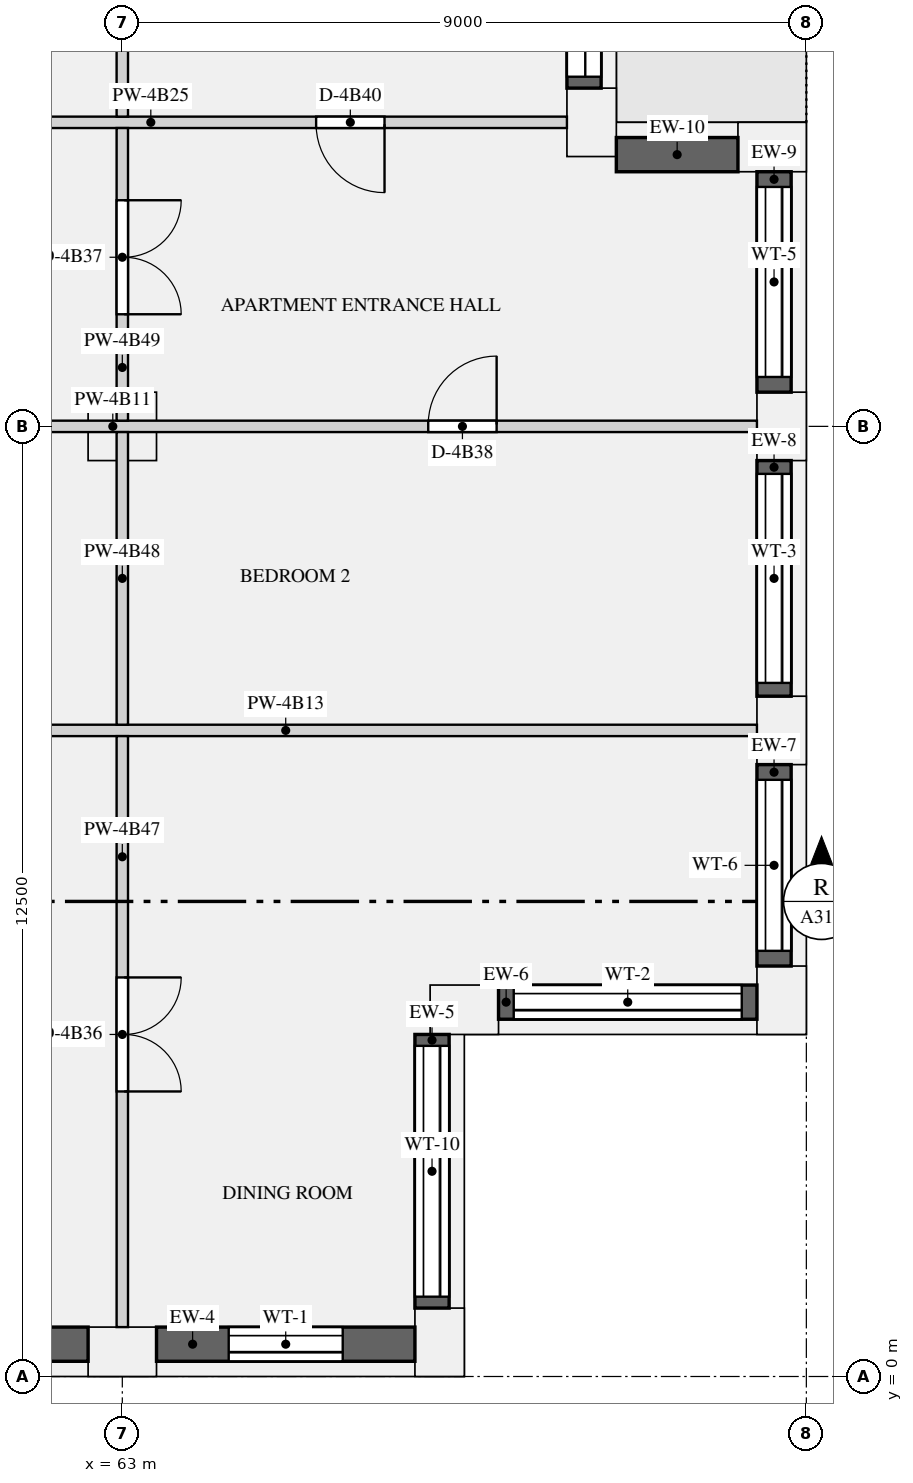
"""IFC4 building model, lengths in metres.
Left out: names, types, materials, properties, quantities, classifications, styles, units other than length and angle.
Written with IfcOpenShell. Run it as: python <this file> out.ifc"""

import sys

from ifc_helpers import new_model, si_unit, direction, frame, frame_2d, origin, origin_2d, place, context, subcontext, project, spatial, rectangle, extrude, element, fill, save


model = new_model("IFC4")
c1 = context("Model", 3, precision=1e-05, world=origin(), true_north=direction((0.0, 1.0)))
c2 = subcontext(c1, "Body", "Model", "MODEL_VIEW")
j1 = project(units=[si_unit("LENGTHUNIT", "METRE"), si_unit("PLANEANGLEUNIT", "RADIAN")], contexts=[c1])
p1 = place(None, origin())
s1 = spatial("IfcSite", under=j1, at=p1, CompositionType="ELEMENT")
p2 = place(p1, origin())
s2 = spatial("IfcBuilding", under=s1, at=p2, CompositionType="ELEMENT")
p3 = place(p2, frame((0.0, 0.0, 207.45)))
s3 = spatial("IfcBuildingStorey", under=s2, at=p3, CompositionType="ELEMENT", Elevation=207.45)
for number, where, z_axis, x_axis in (
    (1, (63.0, 0.325, 0.0), (0.0, 0.0, 1.0), (1.0, 0.0, 0.0)),
    (2, (67.175, 0.45, 0.0), (0.0, 0.0, 1.0), (0.0, 1.0, 0.0)),
    (3, (67.5, 4.825, 0.0), (0.0, 0.0, 1.0), (1.0, 0.0, 0.0)),
    (4, (71.675, 4.95, 0.0), (0.0, 0.0, 1.0), (0.0, 1.0, 0.0)),
    (5, (71.675, 8.5, 0.0), (0.0, 0.0, 1.0), (0.0, 1.0, 0.0)),
    (6, (71.675, 12.5, 0.0), (0.0, 0.0, 1.0), (0.0, 1.0, 0.0)),
    (7, (71.55, 16.175, 0.0), (0.0, 0.0, 1.0), (-1.0, 0.0, 0.0)),
    (8, (69.175, 16.5, 0.0), (0.0, 0.0, 1.0), (0.0, 1.0, 0.0)),
):
    element("IfcColumn", number, at=place(p3, frame(where, z_axis=z_axis, x_axis=x_axis)), inside=s3, PredefinedType="USERDEFINED", context=c2, shape_type="SweptSolid", body=[
        extrude(rectangle(XDim=0.9, YDim=0.65, at=origin_2d()), origin(), (0.0, 0.0, 1.0), 3.15),
    ])
p4 = place(p3, frame((63.0, 12.5, 0.0), z_axis=(0.0, 0.0, 1.0), x_axis=(1.0, 0.0, 0.0)))
e9 = element("IfcColumn", 9, at=p4, inside=s3, PredefinedType="COLUMN", context=c2, shape_type="SweptSolid", body=[
    extrude(rectangle(XDim=0.9, YDim=0.9, at=origin_2d()), origin(), (0.0, 0.0, 1.0), 3.15),
])
p5 = place(p3, frame((58.95, 0.425, 0.9), z_axis=(0.0, 0.0, 1.0), x_axis=(1.0, 0.0, 0.0)))
e10 = element("IfcWall", 10, at=p5, inside=s3, PredefinedType="SOLIDWALL", context=c2, shape_type="SweptSolid", body=[
    extrude(rectangle(XDim=3.6, YDim=0.45, at=frame_2d((1.8, 0.0))), origin(), (0.0, 0.0, 1.0), 1.93),
])
p6 = place(p5, frame((1.05, 0.0, 0.15)))
e11 = element("IfcOpeningElement", 11, at=p6, cuts=e10, PredefinedType="OPENING", context=c2, shape_type="SweptSolid", body=[
    extrude(rectangle(XDim=1.5, YDim=1.5, at=frame_2d((0.75, 0.75))), frame((0.0, 0.235, 0.0), z_axis=(0.0, -1.0, 0.0), x_axis=(1.0, 0.0, 0.0)), (0.0, 0.0, 1.0), 0.47),
])
p7 = place(p3, frame((63.45, 0.425, 0.9), z_axis=(0.0, 0.0, 1.0), x_axis=(1.0, 0.0, 0.0)))
e12 = element("IfcWall", 12, at=p7, inside=s3, PredefinedType="SOLIDWALL", context=c2, shape_type="SweptSolid", body=[
    extrude(rectangle(XDim=3.4, YDim=0.45, at=frame_2d((1.7, 0.0))), origin(), (0.0, 0.0, 1.0), 1.93),
])
p8 = place(p7, frame((0.95, 0.0, 0.15)))
e13 = element("IfcOpeningElement", 13, at=p8, cuts=e12, PredefinedType="OPENING", context=c2, shape_type="SweptSolid", body=[
    extrude(rectangle(XDim=1.5, YDim=1.5, at=frame_2d((0.75, 0.75))), frame((0.0, 0.235, 0.0), z_axis=(0.0, -1.0, 0.0), x_axis=(1.0, 0.0, 0.0)), (0.0, 0.0, 1.0), 0.47),
])
p9 = place(p3, frame((67.075, 0.9, 0.9), z_axis=(0.0, 0.0, 1.0), x_axis=(0.0, 1.0, 0.0)))
e14 = element("IfcWall", 14, at=p9, inside=s3, PredefinedType="SOLIDWALL", context=c2, shape_type="SweptSolid", body=[
    extrude(rectangle(XDim=3.6, YDim=0.45, at=frame_2d((1.8, 0.0))), origin(), (0.0, 0.0, 1.0), 1.93),
])
p10 = place(p9, frame((0.15, 0.0, 0.15)))
e15 = element("IfcOpeningElement", 15, at=p10, cuts=e14, PredefinedType="OPENING", context=c2, shape_type="SweptSolid", body=[
    extrude(rectangle(XDim=3.3, YDim=1.5, at=frame_2d((1.65, 0.75))), frame((0.0, 0.235, 0.0), z_axis=(0.0, -1.0, 0.0), x_axis=(1.0, 0.0, 0.0)), (0.0, 0.0, 1.0), 0.47),
])
p11 = place(p3, frame((67.95, 4.925, 0.9), z_axis=(0.0, 0.0, 1.0), x_axis=(1.0, 0.0, 0.0)))
e16 = element("IfcWall", 16, at=p11, inside=s3, PredefinedType="SOLIDWALL", context=c2, shape_type="SweptSolid", body=[
    extrude(rectangle(XDim=3.4, YDim=0.45, at=frame_2d((1.7, 0.0))), origin(), (0.0, 0.0, 1.0), 1.93),
])
p12 = place(p11, frame((0.2, 0.0, 0.15)))
e17 = element("IfcOpeningElement", 17, at=p12, cuts=e16, PredefinedType="OPENING", context=c2, shape_type="SweptSolid", body=[
    extrude(rectangle(XDim=3.0, YDim=1.5, at=frame_2d((1.5, 0.75))), frame((0.0, 0.235, 0.0), z_axis=(0.0, -1.0, 0.0), x_axis=(1.0, 0.0, 0.0)), (0.0, 0.0, 1.0), 0.47),
])
p13 = place(p3, frame((71.575, 5.4, 0.9), z_axis=(0.0, 0.0, 1.0), x_axis=(0.0, 1.0, 0.0)))
e18 = element("IfcWall", 18, at=p13, inside=s3, PredefinedType="SOLIDWALL", context=c2, shape_type="SweptSolid", body=[
    extrude(rectangle(XDim=2.65, YDim=0.45, at=frame_2d((1.325, 0.0))), origin(), (0.0, 0.0, 1.0), 1.93),
])
p14 = place(p13, frame((0.2, 0.0, 0.15)))
e19 = element("IfcOpeningElement", 19, at=p14, cuts=e18, PredefinedType="OPENING", context=c2, shape_type="SweptSolid", body=[
    extrude(rectangle(XDim=2.25, YDim=1.5, at=frame_2d((1.125, 0.75))), frame((0.0, 0.235, 0.0), z_axis=(0.0, -1.0, 0.0), x_axis=(1.0, 0.0, 0.0)), (0.0, 0.0, 1.0), 0.47),
])
p15 = place(p3, frame((71.575, 8.95, 0.9), z_axis=(0.0, 0.0, 1.0), x_axis=(0.0, 1.0, 0.0)))
e20 = element("IfcWall", 20, at=p15, inside=s3, PredefinedType="SOLIDWALL", context=c2, shape_type="SweptSolid", body=[
    extrude(rectangle(XDim=3.1, YDim=0.45, at=frame_2d((1.55, 0.0))), origin(), (0.0, 0.0, 1.0), 1.93),
])
p16 = place(p15, frame((0.175, 0.0, 0.15)))
e21 = element("IfcOpeningElement", 21, at=p16, cuts=e20, PredefinedType="OPENING", context=c2, shape_type="SweptSolid", body=[
    extrude(rectangle(XDim=2.75, YDim=1.5, at=frame_2d((1.375, 0.75))), frame((0.0, 0.235, 0.0), z_axis=(0.0, -1.0, 0.0), x_axis=(1.0, 0.0, 0.0)), (0.0, 0.0, 1.0), 0.47),
])
p17 = place(p3, frame((71.575, 12.95, 0.9), z_axis=(0.0, 0.0, 1.0), x_axis=(0.0, 1.0, 0.0)))
e22 = element("IfcWall", 22, at=p17, inside=s3, PredefinedType="SOLIDWALL", context=c2, shape_type="SweptSolid", body=[
    extrude(rectangle(XDim=2.9, YDim=0.45, at=frame_2d((1.45, 0.0))), origin(), (0.0, 0.0, 1.0), 1.93),
])
p18 = place(p17, frame((0.2, 0.0, 0.15)))
e23 = element("IfcOpeningElement", 23, at=p18, cuts=e22, PredefinedType="OPENING", context=c2, shape_type="SweptSolid", body=[
    extrude(rectangle(XDim=2.5, YDim=1.5, at=frame_2d((1.25, 0.75))), frame((0.0, 0.235, 0.0), z_axis=(0.0, -1.0, 0.0), x_axis=(1.0, 0.0, 0.0)), (0.0, 0.0, 1.0), 0.47),
])
p19 = place(p3, frame((71.1, 16.075, 0.9), z_axis=(0.0, 0.0, 1.0), x_axis=(-1.0, 0.0, 0.0)))
e24 = element("IfcWall", 24, at=p19, inside=s3, PredefinedType="SOLIDWALL", context=c2, shape_type="SweptSolid", body=[
    extrude(rectangle(XDim=1.6, YDim=0.45, at=frame_2d((0.8, 0.0))), origin(), (0.0, 0.0, 1.0), 1.93),
])
p20 = place(p3, frame((69.075, 16.95, 0.0), z_axis=(0.0, 0.0, 1.0), x_axis=(0.0, 1.0, 0.0)))
e25 = element("IfcWall", 25, at=p20, inside=s3, PredefinedType="SOLIDWALL", context=c2, shape_type="SweptSolid", body=[
    extrude(rectangle(XDim=3.1, YDim=0.45, at=frame_2d((1.55, 0.0))), origin(), (0.0, 0.0, 1.0), 2.83),
])
p21 = place(p20, frame((0.15, 0.0, 0.0)))
e26 = element("IfcOpeningElement", 26, at=p21, cuts=e25, PredefinedType="OPENING", context=c2, shape_type="SweptSolid", body=[
    extrude(rectangle(XDim=2.8, YDim=2.3, at=frame_2d((1.4, 1.15))), frame((0.0, 0.235, 0.0), z_axis=(0.0, -1.0, 0.0), x_axis=(1.0, 0.0, 0.0)), (0.0, 0.0, 1.0), 0.47),
])
p22 = place(p3, frame((54.0, 12.5, 0.0), z_axis=(0.0, 0.0, 1.0), x_axis=(1.0, 0.0, 0.0)))
e27 = element("IfcWall", 27, at=p22, inside=s3, PredefinedType="PARTITIONING", context=c2, shape_type="SweptSolid", body=[
    extrude(rectangle(XDim=17.35, YDim=0.15, at=frame_2d((8.675, 0.0))), origin(), (0.0, 0.0, 1.0), 2.83),
])
p23 = place(p22, frame((3.825, 0.0, 0.0)))
e28 = element("IfcOpeningElement", 28, at=p23, cuts=e27, PredefinedType="OPENING", context=c2, shape_type="SweptSolid", body=[
    extrude(rectangle(XDim=0.9, YDim=2.1, at=frame_2d((0.45, 1.05))), frame((0.0, 0.085, 0.0), z_axis=(0.0, -1.0, 0.0), x_axis=(1.0, 0.0, 0.0)), (0.0, 0.0, 1.0), 0.17),
])
p24 = place(p22, frame((13.025, 0.0, 0.0)))
e29 = element("IfcOpeningElement", 29, at=p24, cuts=e27, PredefinedType="OPENING", context=c2, shape_type="SweptSolid", body=[
    extrude(rectangle(XDim=0.9, YDim=2.1, at=frame_2d((0.45, 1.05))), frame((0.0, 0.085, 0.0), z_axis=(0.0, -1.0, 0.0), x_axis=(1.0, 0.0, 0.0)), (0.0, 0.0, 1.0), 0.17),
])
p25 = place(p3, frame((54.0, 8.5, 0.0), z_axis=(0.0, 0.0, 1.0), x_axis=(1.0, 0.0, 0.0)))
e30 = element("IfcWall", 30, at=p25, inside=s3, PredefinedType="PARTITIONING", context=c2, shape_type="SweptSolid", body=[
    extrude(rectangle(XDim=17.35, YDim=0.15, at=frame_2d((8.675, 0.0))), origin(), (0.0, 0.0, 1.0), 2.83),
])
p26 = place(p25, frame((4.05, 0.0, 0.0)))
e31 = element("IfcOpeningElement", 31, at=p26, cuts=e30, PredefinedType="OPENING", context=c2, shape_type="SweptSolid", body=[
    extrude(rectangle(XDim=0.9, YDim=2.1, at=frame_2d((0.45, 1.05))), frame((0.0, 0.085, 0.0), z_axis=(0.0, -1.0, 0.0), x_axis=(1.0, 0.0, 0.0)), (0.0, 0.0, 1.0), 0.17),
])
p27 = place(p3, frame((54.1, 16.5, 0.0), z_axis=(0.0, 0.0, 1.0), x_axis=(1.0, 0.0, 0.0)))
e32 = element("IfcWall", 32, at=p27, inside=s3, PredefinedType="PARTITIONING", context=c2, shape_type="SweptSolid", body=[
    extrude(rectangle(XDim=14.75, YDim=0.15, at=frame_2d((7.375, 0.0))), origin(), (0.0, 0.0, 1.0), 2.83),
])
p28 = place(p27, frame((1.4, 0.0, 0.0)))
e33 = element("IfcOpeningElement", 33, at=p28, cuts=e32, PredefinedType="OPENING", context=c2, shape_type="SweptSolid", body=[
    extrude(rectangle(XDim=1.5, YDim=2.1, at=frame_2d((0.75, 1.05))), frame((0.0, 0.085, 0.0), z_axis=(0.0, -1.0, 0.0), x_axis=(1.0, 0.0, 0.0)), (0.0, 0.0, 1.0), 0.17),
])
p29 = place(p27, frame((6.2, 0.0, 0.0)))
e34 = element("IfcOpeningElement", 34, at=p29, cuts=e32, PredefinedType="OPENING", context=c2, shape_type="SweptSolid", body=[
    extrude(rectangle(XDim=0.9, YDim=2.1, at=frame_2d((0.45, 1.05))), frame((0.0, 0.085, 0.0), z_axis=(0.0, -1.0, 0.0), x_axis=(1.0, 0.0, 0.0)), (0.0, 0.0, 1.0), 0.17),
])
p30 = place(p27, frame((11.45, 0.0, 0.0)))
e35 = element("IfcOpeningElement", 35, at=p30, cuts=e32, PredefinedType="OPENING", context=c2, shape_type="SweptSolid", body=[
    extrude(rectangle(XDim=0.9, YDim=2.1, at=frame_2d((0.45, 1.05))), frame((0.0, 0.085, 0.0), z_axis=(0.0, -1.0, 0.0), x_axis=(1.0, 0.0, 0.0)), (0.0, 0.0, 1.0), 0.17),
])
p31 = place(p3, frame((63.0, 0.65, 0.0), z_axis=(0.0, 0.0, 1.0), x_axis=(0.0, 1.0, 0.0)))
e36 = element("IfcWall", 36, at=p31, inside=s3, PredefinedType="PARTITIONING", context=c2, shape_type="SweptSolid", body=[
    extrude(rectangle(XDim=7.775, YDim=0.15, at=frame_2d((3.888, 0.0))), origin(), (0.0, 0.0, 1.0), 2.83),
])
p32 = place(p31, frame((3.1, 0.0, 0.0)))
e37 = element("IfcOpeningElement", 37, at=p32, cuts=e36, PredefinedType="OPENING", context=c2, shape_type="SweptSolid", body=[
    extrude(rectangle(XDim=1.5, YDim=2.1, at=frame_2d((0.75, 1.05))), frame((0.0, 0.085, 0.0), z_axis=(0.0, -1.0, 0.0), x_axis=(1.0, 0.0, 0.0)), (0.0, 0.0, 1.0), 0.17),
])
p33 = place(p3, frame((63.0, 8.575, 0.0), z_axis=(0.0, 0.0, 1.0), x_axis=(0.0, 1.0, 0.0)))
e38 = element("IfcWall", 38, at=p33, inside=s3, PredefinedType="PARTITIONING", context=c2, shape_type="SweptSolid", body=[
    extrude(rectangle(XDim=3.85, YDim=0.15, at=frame_2d((1.925, 0.0))), origin(), (0.0, 0.0, 1.0), 2.83),
])
p34 = place(p3, frame((63.0, 12.575, 0.0), z_axis=(0.0, 0.0, 1.0), x_axis=(0.0, 1.0, 0.0)))
e39 = element("IfcWall", 39, at=p34, inside=s3, PredefinedType="PARTITIONING", context=c2, shape_type="SweptSolid", body=[
    extrude(rectangle(XDim=3.85, YDim=0.15, at=frame_2d((1.925, 0.0))), origin(), (0.0, 0.0, 1.0), 2.83),
])
p35 = place(p34, frame((1.4, 0.0, 0.0)))
e40 = element("IfcOpeningElement", 40, at=p35, cuts=e39, PredefinedType="OPENING", context=c2, shape_type="SweptSolid", body=[
    extrude(rectangle(XDim=1.5, YDim=2.1, at=frame_2d((0.75, 1.05))), frame((0.0, 0.085, 0.0), z_axis=(0.0, -1.0, 0.0), x_axis=(1.0, 0.0, 0.0)), (0.0, 0.0, 1.0), 0.17),
])
p36 = place(p3, frame((63.0, 16.575, 0.0), z_axis=(0.0, 0.0, 1.0), x_axis=(0.0, 1.0, 0.0)))
e41 = element("IfcWall", 41, at=p36, inside=s3, PredefinedType="PARTITIONING", context=c2, shape_type="SweptSolid", body=[
    extrude(rectangle(XDim=11.825, YDim=0.15, at=frame_2d((5.913, 0.0))), origin(), (0.0, 0.0, 1.0), 2.83),
])
p37 = place(p8, origin())
e42 = element("IfcWindow", 42, at=p37, inside=s3, PartitioningType="SINGLE_PANEL", PredefinedType="WINDOW", context=c2, shape_type="SweptSolid", body=[
    extrude(rectangle(XDim=1.5, YDim=1.5, at=frame_2d((0.75, 0.75))), frame((0.0, -0.065, 0.0), z_axis=(0.0, -1.0, 0.0), x_axis=(1.0, 0.0, 0.0)), (0.0, 0.0, 1.0), 0.06),
])
fill(e13, e42)
p38 = place(p10, origin())
e43 = element("IfcWindow", 43, at=p38, inside=s3, PartitioningType="SINGLE_PANEL", PredefinedType="WINDOW", context=c2, shape_type="SweptSolid", body=[
    extrude(rectangle(XDim=3.3, YDim=1.5, at=frame_2d((1.65, 0.75))), frame((0.0, -0.065, 0.0), z_axis=(0.0, -1.0, 0.0), x_axis=(1.0, 0.0, 0.0)), (0.0, 0.0, 1.0), 0.06),
])
fill(e15, e43)
p39 = place(p12, origin())
e44 = element("IfcWindow", 44, at=p39, inside=s3, PartitioningType="SINGLE_PANEL", PredefinedType="WINDOW", context=c2, shape_type="SweptSolid", body=[
    extrude(rectangle(XDim=3.0, YDim=1.5, at=frame_2d((1.5, 0.75))), frame((0.0, -0.065, 0.0), z_axis=(0.0, -1.0, 0.0), x_axis=(1.0, 0.0, 0.0)), (0.0, 0.0, 1.0), 0.06),
])
fill(e17, e44)
p40 = place(p14, origin())
e45 = element("IfcWindow", 45, at=p40, inside=s3, PartitioningType="SINGLE_PANEL", PredefinedType="WINDOW", context=c2, shape_type="SweptSolid", body=[
    extrude(rectangle(XDim=2.25, YDim=1.5, at=frame_2d((1.125, 0.75))), frame((0.0, -0.065, 0.0), z_axis=(0.0, -1.0, 0.0), x_axis=(1.0, 0.0, 0.0)), (0.0, 0.0, 1.0), 0.06),
])
fill(e19, e45)
p41 = place(p16, origin())
e46 = element("IfcWindow", 46, at=p41, inside=s3, PartitioningType="SINGLE_PANEL", PredefinedType="WINDOW", context=c2, shape_type="SweptSolid", body=[
    extrude(rectangle(XDim=2.75, YDim=1.5, at=frame_2d((1.375, 0.75))), frame((0.0, -0.065, 0.0), z_axis=(0.0, -1.0, 0.0), x_axis=(1.0, 0.0, 0.0)), (0.0, 0.0, 1.0), 0.06),
])
fill(e21, e46)
p42 = place(p18, origin())
e47 = element("IfcWindow", 47, at=p42, inside=s3, PartitioningType="SINGLE_PANEL", PredefinedType="WINDOW", context=c2, shape_type="SweptSolid", body=[
    extrude(rectangle(XDim=2.5, YDim=1.5, at=frame_2d((1.25, 0.75))), frame((0.0, -0.065, 0.0), z_axis=(0.0, -1.0, 0.0), x_axis=(1.0, 0.0, 0.0)), (0.0, 0.0, 1.0), 0.06),
])
fill(e23, e47)
p43 = place(p21, origin())
e48 = element("IfcDoor", 48, at=p43, inside=s3, OperationType="SLIDING_TO_LEFT", PredefinedType="DOOR", context=c2, shape_type="SweptSolid", body=[
    extrude(rectangle(XDim=2.8, YDim=2.3, at=frame_2d((1.4, 1.15))), frame((0.0, -0.07, 0.0), z_axis=(0.0, -1.0, 0.0), x_axis=(1.0, 0.0, 0.0)), (0.0, 0.0, 1.0), 0.05),
])
fill(e26, e48)
p44 = place(p32, frame((1.5, 0.0, 0.0), z_axis=(0.0, 0.0, 1.0), x_axis=(-1.0, 0.0, 0.0)))
e49 = element("IfcDoor", 49, at=p44, inside=s3, OperationType="DOUBLE_DOOR_SINGLE_SWING", PredefinedType="DOOR", context=c2, shape_type="SweptSolid", body=[
    extrude(rectangle(XDim=1.5, YDim=2.1, at=frame_2d((0.75, 1.05))), frame((0.0, 0.025, 0.0), z_axis=(0.0, -1.0, 0.0), x_axis=(1.0, 0.0, 0.0)), (0.0, 0.0, 1.0), 0.05),
])
fill(e37, e49)
p45 = place(p35, frame((1.5, 0.0, 0.0), z_axis=(0.0, 0.0, 1.0), x_axis=(-1.0, 0.0, 0.0)))
e50 = element("IfcDoor", 50, at=p45, inside=s3, OperationType="DOUBLE_DOOR_SINGLE_SWING", PredefinedType="DOOR", context=c2, shape_type="SweptSolid", body=[
    extrude(rectangle(XDim=1.5, YDim=2.1, at=frame_2d((0.75, 1.05))), frame((0.0, 0.025, 0.0), z_axis=(0.0, -1.0, 0.0), x_axis=(1.0, 0.0, 0.0)), (0.0, 0.0, 1.0), 0.05),
])
fill(e40, e50)
p46 = place(p24, origin())
e51 = element("IfcDoor", 51, at=p46, inside=s3, OperationType="SINGLE_SWING_RIGHT", PredefinedType="DOOR", context=c2, shape_type="SweptSolid", body=[
    extrude(rectangle(XDim=0.9, YDim=2.1, at=frame_2d((0.45, 1.05))), frame((0.0, 0.025, 0.0), z_axis=(0.0, -1.0, 0.0), x_axis=(1.0, 0.0, 0.0)), (0.0, 0.0, 1.0), 0.05),
])
fill(e29, e51)
p47 = place(p30, frame((0.9, 0.0, 0.0), z_axis=(0.0, 0.0, 1.0), x_axis=(-1.0, 0.0, 0.0)))
e52 = element("IfcDoor", 52, at=p47, inside=s3, OperationType="SINGLE_SWING_LEFT", PredefinedType="DOOR", context=c2, shape_type="SweptSolid", body=[
    extrude(rectangle(XDim=0.9, YDim=2.1, at=frame_2d((0.45, 1.05))), frame((0.0, 0.025, 0.0), z_axis=(0.0, -1.0, 0.0), x_axis=(1.0, 0.0, 0.0)), (0.0, 0.0, 1.0), 0.05),
])
fill(e35, e52)
save(model, sys.argv[1])
